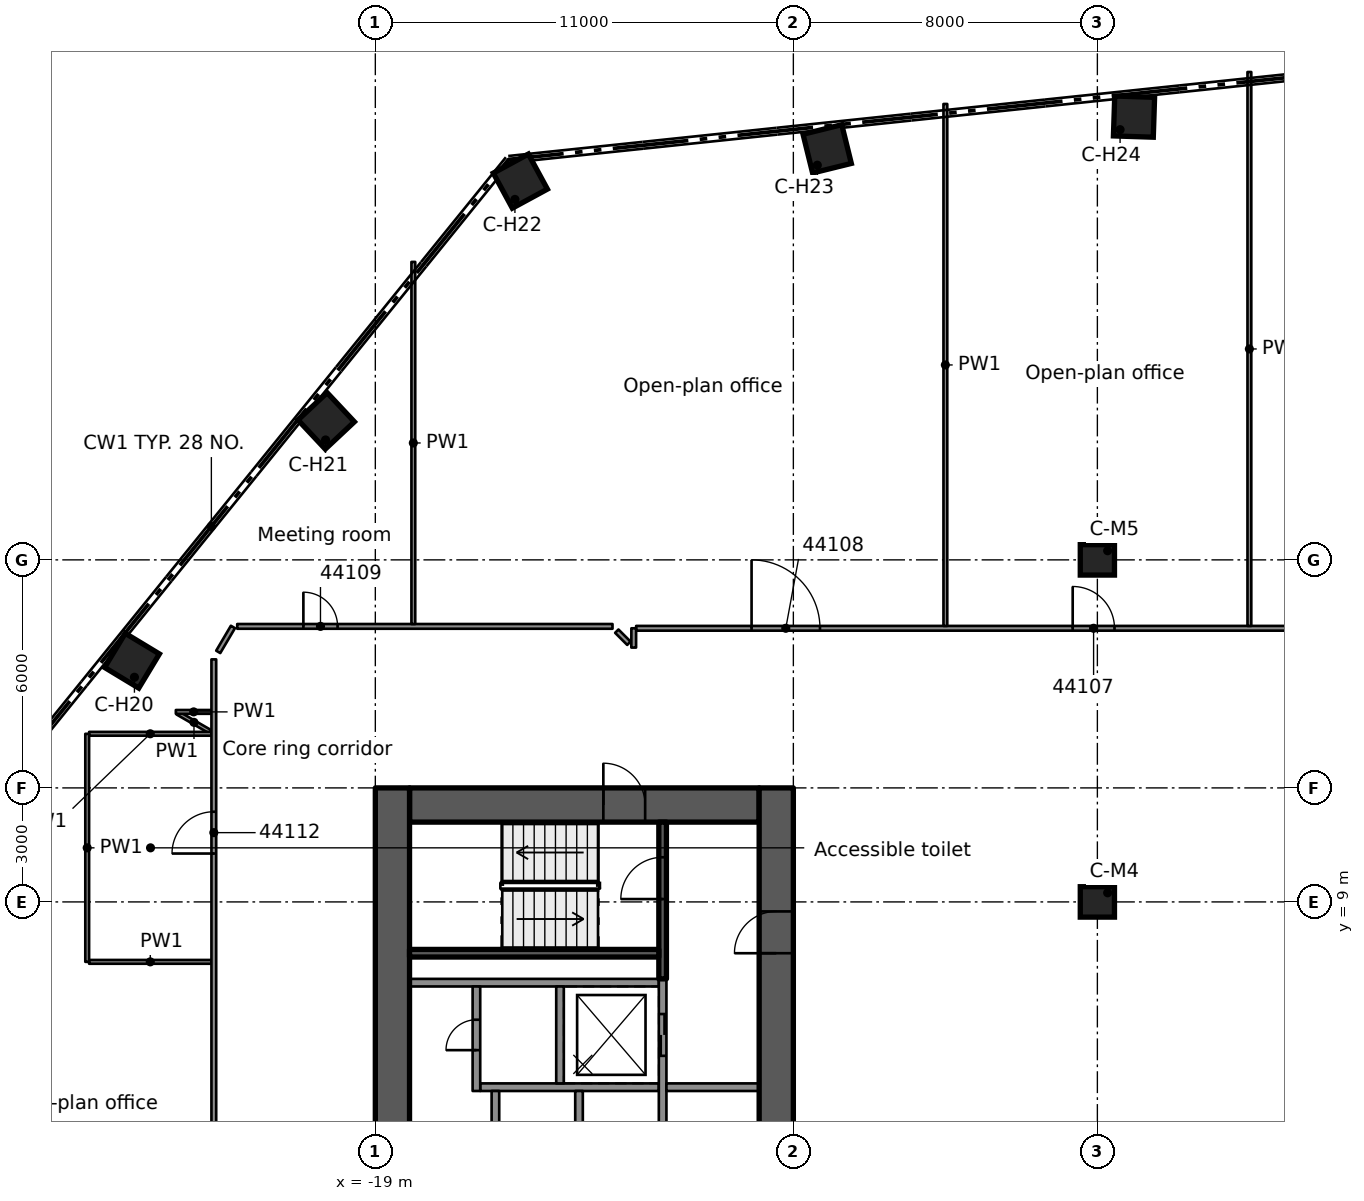
"""IFC4 building model, lengths in metres.
Left out: names, types, materials, properties, quantities, classifications, styles, units other than length and angle.
Written with IfcOpenShell. Run it as: python <this file> out.ifc"""

import sys

from ifc_helpers import new_model, si_unit, direction, frame, frame_2d, origin, origin_2d, place, context, subcontext, project, spatial, rectangle, extrude, element, fill, save


model = new_model("IFC4")
c1 = context("Model", 3, precision=1e-05, world=origin(), true_north=direction((0.0, 1.0)))
c2 = subcontext(c1, "Body", "Model", "MODEL_VIEW")
j1 = project(units=[si_unit("LENGTHUNIT", "METRE"), si_unit("PLANEANGLEUNIT", "RADIAN")], contexts=[c1])
p1 = place(None, origin())
s1 = spatial("IfcSite", under=j1, at=p1, CompositionType="ELEMENT")
p2 = place(p1, origin())
s2 = spatial("IfcBuilding", under=s1, at=p2, CompositionType="ELEMENT")
p3 = place(p2, frame((0.0, 0.0, 217.5)))
s3 = spatial("IfcBuildingStorey", under=s2, at=p3, CompositionType="ELEMENT", Elevation=217.5)
p4 = place(p3, frame((-18.1, 11.55, 0.0), z_axis=(0.0, 0.0, 1.0), x_axis=(1.0, 0.0, 0.0)))
e1 = element("IfcWall", 1, at=p4, inside=s3, PredefinedType="SHEAR", context=c2, shape_type="SweptSolid", body=[
    extrude(rectangle(XDim=9.2, YDim=0.9, at=frame_2d((4.6, 0.0))), origin(), (0.0, 0.0, 1.0), 3.5),
])
p5 = place(p4, frame((5.1, 0.0, 0.0)))
e2 = element("IfcOpeningElement", 2, at=p5, cuts=e1, PredefinedType="OPENING", context=c2, shape_type="SweptSolid", body=[
    extrude(rectangle(XDim=1.1, YDim=2.1, at=frame_2d((0.55, 1.05))), frame((0.0, 0.46, 0.0), z_axis=(0.0, -1.0, 0.0), x_axis=(1.0, 0.0, 0.0)), (0.0, 0.0, 1.0), 0.92),
])
p6 = place(p3, frame((-18.55, -12.0, 0.0), z_axis=(0.0, 0.0, 1.0), x_axis=(0.0, 1.0, 0.0)))
e3 = element("IfcWall", 3, at=p6, inside=s3, PredefinedType="SHEAR", context=c2, shape_type="SweptSolid", body=[
    extrude(rectangle(XDim=24.0, YDim=0.9, at=frame_2d((12.0, 0.0))), origin(), (0.0, 0.0, 1.0), 3.5),
])
p7 = place(p6, frame((10.1, 0.0, 0.0)))
e4 = element("IfcOpeningElement", 4, at=p7, cuts=e3, PredefinedType="OPENING", context=c2, shape_type="SweptSolid", body=[
    extrude(rectangle(XDim=1.8, YDim=2.1, at=frame_2d((0.9, 1.05))), frame((0.0, 0.46, 0.0), z_axis=(0.0, -1.0, 0.0), x_axis=(1.0, 0.0, 0.0)), (0.0, 0.0, 1.0), 0.92),
])
p8 = place(p3, frame((-8.45, -12.0, 0.0), z_axis=(0.0, 0.0, 1.0), x_axis=(0.0, 1.0, 0.0)))
e5 = element("IfcWall", 5, at=p8, inside=s3, PredefinedType="SHEAR", context=c2, shape_type="SweptSolid", body=[
    extrude(rectangle(XDim=24.0, YDim=0.9, at=frame_2d((12.0, 0.0))), origin(), (0.0, 0.0, 1.0), 3.5),
])
p9 = place(p8, frame((9.6, 0.0, 0.0)))
e6 = element("IfcOpeningElement", 6, at=p9, cuts=e5, PredefinedType="OPENING", context=c2, shape_type="SweptSolid", body=[
    extrude(rectangle(XDim=1.8, YDim=2.1, at=frame_2d((0.9, 1.05))), frame((0.0, 0.46, 0.0), z_axis=(0.0, -1.0, 0.0), x_axis=(1.0, 0.0, 0.0)), (0.0, 0.0, 1.0), 0.92),
])
p10 = place(p8, frame((19.65, 0.0, 0.0)))
e7 = element("IfcOpeningElement", 7, at=p10, cuts=e5, PredefinedType="OPENING", context=c2, shape_type="SweptSolid", body=[
    extrude(rectangle(XDim=1.1, YDim=2.1, at=frame_2d((0.55, 1.05))), frame((0.0, 0.46, 0.0), z_axis=(0.0, -1.0, 0.0), x_axis=(1.0, 0.0, 0.0)), (0.0, 0.0, 1.0), 0.92),
])
for number, where, z_axis, x_axis in (
    (8, (-25.403, 15.347, 0.0), (0.0, 0.0, 1.0), (-0.856, 0.517, 0.0)),
    (9, (-20.293, 21.657, 0.0), (0.0, 0.0, 1.0), (-0.684, 0.73, 0.0)),
    (10, (-15.184, 27.966, 0.0), (0.0, 0.0, 1.0), (-0.477, 0.879, 0.0)),
    (11, (-7.11, 28.815, 0.0), (0.0, 0.0, 1.0), (-0.24, 0.971, 0.0)),
    (12, (0.964, 29.663, 0.0), (0.0, 0.0, 1.0), (0.032, 0.999, 0.0)),
):
    element("IfcColumn", number, at=place(p3, frame(where, z_axis=z_axis, x_axis=x_axis)), inside=s3, PredefinedType="COLUMN", context=c2, shape_type="SweptSolid", body=[
        extrude(rectangle(XDim=1.05, YDim=1.05, at=origin_2d()), origin(), (0.0, 0.0, 1.0), 3.5),
    ])
for number, where, z_axis, x_axis in (
    (13, (0.0, 9.0, 0.0), (0.0, 0.0, 1.0), (1.0, 0.0, 0.0)),
    (14, (0.0, 18.0, 0.0), (0.0, 0.0, 1.0), (1.0, 0.0, 0.0)),
):
    element("IfcColumn", number, at=place(p3, frame(where, z_axis=z_axis, x_axis=x_axis)), inside=s3, PredefinedType="COLUMN", context=c2, shape_type="SweptSolid", body=[
        extrude(rectangle(XDim=0.9, YDim=0.8, at=origin_2d()), origin(), (0.0, 0.0, 1.0), 3.5),
    ])
p11 = place(p3, frame((-11.54, 6.875, 0.0), z_axis=(0.0, 0.0, 1.0), x_axis=(-1.0, 0.0, 0.0)))
e15 = element("IfcWall", 15, at=p11, inside=s3, PredefinedType="SOLIDWALL", context=c2, shape_type="SweptSolid", body=[
    extrude(rectangle(XDim=6.56, YDim=0.2, at=frame_2d((3.28, 0.0))), origin(), (0.0, 0.0, 1.0), 3.08),
])
p12 = place(p3, frame((-11.54, 4.125, 0.0), z_axis=(0.0, 0.0, 1.0), x_axis=(-1.0, 0.0, 0.0)))
e16 = element("IfcWall", 16, at=p12, inside=s3, PredefinedType="SOLIDWALL", context=c2, shape_type="SweptSolid", body=[
    extrude(rectangle(XDim=4.7, YDim=0.2, at=frame_2d((2.35, 0.0))), origin(), (0.0, 0.0, 1.0), 3.08),
])
p13 = place(p3, frame((-11.44, -6.975, 0.0), z_axis=(0.0, 0.0, 1.0), x_axis=(0.0, 1.0, 0.0)))
e17 = element("IfcWall", 17, at=p13, inside=s3, PredefinedType="SOLIDWALL", context=c2, shape_type="SweptSolid", body=[
    extrude(rectangle(XDim=13.95, YDim=0.2, at=frame_2d((6.975, 0.0))), origin(), (0.0, 0.0, 1.0), 3.08),
])
p14 = place(p13, frame((0.925, 0.0, 0.0)))
e18 = element("IfcOpeningElement", 18, at=p14, cuts=e17, PredefinedType="OPENING", context=c2, shape_type="SweptSolid", body=[
    extrude(rectangle(XDim=1.1, YDim=2.1, at=frame_2d((0.55, 1.05))), frame((0.0, 0.11, 0.0), z_axis=(0.0, -1.0, 0.0), x_axis=(1.0, 0.0, 0.0)), (0.0, 0.0, 1.0), 0.22),
])
p15 = place(p13, frame((3.675, 0.0, 0.0)))
e19 = element("IfcOpeningElement", 19, at=p15, cuts=e17, PredefinedType="OPENING", context=c2, shape_type="SweptSolid", body=[
    extrude(rectangle(XDim=1.1, YDim=2.1, at=frame_2d((0.55, 1.05))), frame((0.0, 0.11, 0.0), z_axis=(0.0, -1.0, 0.0), x_axis=(1.0, 0.0, 0.0)), (0.0, 0.0, 1.0), 0.22),
])
p16 = place(p13, frame((11.925, 0.0, 0.0)))
e20 = element("IfcOpeningElement", 20, at=p16, cuts=e17, PredefinedType="OPENING", context=c2, shape_type="SweptSolid", body=[
    extrude(rectangle(XDim=1.1, YDim=2.1, at=frame_2d((0.55, 1.05))), frame((0.0, 0.11, 0.0), z_axis=(0.0, -1.0, 0.0), x_axis=(1.0, 0.0, 0.0)), (0.0, 0.0, 1.0), 0.22),
])
p17 = place(p13, frame((6.575, 0.0, 0.0)))
e21 = element("IfcOpeningElement", 21, at=p17, cuts=e17, PredefinedType="OPENING", context=c2, shape_type="SweptSolid", body=[
    extrude(rectangle(XDim=0.8, YDim=2.1, at=frame_2d((0.4, 1.05))), frame((0.0, 0.11, 0.0), z_axis=(0.0, -1.0, 0.0), x_axis=(1.0, 0.0, 0.0)), (0.0, 0.0, 1.0), 0.22),
])
p18 = place(p3, frame((-13.64, -4.025, 0.0), z_axis=(0.0, 0.0, 1.0), x_axis=(0.0, 1.0, 0.0)))
e22 = element("IfcWall", 22, at=p18, inside=s3, PredefinedType="SOLIDWALL", context=c2, shape_type="SweptSolid", body=[
    extrude(rectangle(XDim=8.05, YDim=0.2, at=frame_2d((4.025, 0.0))), origin(), (0.0, 0.0, 1.0), 3.08),
])
p19 = place(p3, frame((-14.14, 4.225, 0.0), z_axis=(0.0, 0.0, 1.0), x_axis=(0.0, 1.0, 0.0)))
e23 = element("IfcWall", 23, at=p19, inside=s3, PredefinedType="SOLIDWALL", context=c2, shape_type="SweptSolid", body=[
    extrude(rectangle(XDim=2.55, YDim=0.2, at=frame_2d((1.275, 0.0))), origin(), (0.0, 0.0, 1.0), 3.08),
])
p20 = place(p3, frame((-15.84, -4.025, 0.0), z_axis=(0.0, 0.0, 1.0), x_axis=(0.0, 1.0, 0.0)))
e24 = element("IfcWall", 24, at=p20, inside=s3, PredefinedType="SOLIDWALL", context=c2, shape_type="SweptSolid", body=[
    extrude(rectangle(XDim=8.05, YDim=0.2, at=frame_2d((4.025, 0.0))), origin(), (0.0, 0.0, 1.0), 3.08),
])
p21 = place(p20, frame((0.875, 0.0, 0.0)))
e25 = element("IfcOpeningElement", 25, at=p21, cuts=e24, PredefinedType="OPENING", context=c2, shape_type="SweptSolid", body=[
    extrude(rectangle(XDim=0.8, YDim=2.1, at=frame_2d((0.4, 1.05))), frame((0.0, 0.11, 0.0), z_axis=(0.0, -1.0, 0.0), x_axis=(1.0, 0.0, 0.0)), (0.0, 0.0, 1.0), 0.22),
])
p22 = place(p3, frame((-16.34, 4.025, 0.0), z_axis=(0.0, 0.0, 1.0), x_axis=(0.0, 1.0, 0.0)))
e26 = element("IfcWall", 26, at=p22, inside=s3, PredefinedType="SOLIDWALL", context=c2, shape_type="SweptSolid", body=[
    extrude(rectangle(XDim=2.75, YDim=0.2, at=frame_2d((1.375, 0.0))), origin(), (0.0, 0.0, 1.0), 3.08),
])
p23 = place(p22, frame((1.075, 0.0, 0.0)))
e27 = element("IfcOpeningElement", 27, at=p23, cuts=e26, PredefinedType="OPENING", context=c2, shape_type="SweptSolid", body=[
    extrude(rectangle(XDim=0.8, YDim=2.1, at=frame_2d((0.4, 1.05))), frame((0.0, 0.11, 0.0), z_axis=(0.0, -1.0, 0.0), x_axis=(1.0, 0.0, 0.0)), (0.0, 0.0, 1.0), 0.22),
])
p24 = place(p3, frame((-11.44, 6.975, 0.0), z_axis=(0.0, 0.0, 1.0), x_axis=(0.0, 1.0, 0.0)))
e28 = element("IfcWall", 28, at=p24, inside=s3, PredefinedType="SOLIDWALL", context=c2, shape_type="SweptSolid", body=[
    extrude(rectangle(XDim=4.125, YDim=0.2, at=frame_2d((2.062, 0.0))), origin(), (0.0, 0.0, 1.0), 3.08),
])
p25 = place(p24, frame((2.1, 0.0, 0.0)))
e29 = element("IfcOpeningElement", 29, at=p25, cuts=e28, PredefinedType="OPENING", context=c2, shape_type="SweptSolid", body=[
    extrude(rectangle(XDim=1.1, YDim=2.1, at=frame_2d((0.55, 1.05))), frame((0.0, 0.11, 0.0), z_axis=(0.0, -1.0, 0.0), x_axis=(1.0, 0.0, 0.0)), (0.0, 0.0, 1.0), 0.22),
])
p26 = place(p3, frame((-11.54, 7.65, 0.0), z_axis=(0.0, 0.0, 1.0), x_axis=(-1.0, 0.0, 0.0)))
e30 = element("IfcWall", 30, at=p26, inside=s3, PredefinedType="SOLIDWALL", context=c2, shape_type="SweptSolid", body=[
    extrude(rectangle(XDim=6.56, YDim=0.2, at=frame_2d((3.28, 0.0))), origin(), (0.0, 0.0, 1.0), 3.08),
])
p27 = place(p3, frame((-8.9, 4.125, 0.0), z_axis=(0.0, 0.0, 1.0), x_axis=(-1.0, 0.0, 0.0)))
e31 = element("IfcWall", 31, at=p27, inside=s3, PredefinedType="PARTITIONING", context=c2, shape_type="SweptSolid", body=[
    extrude(rectangle(XDim=2.44, YDim=0.2, at=frame_2d((1.22, 0.0))), origin(), (0.0, 0.0, 1.0), 3.08),
])
p28 = place(p3, frame((-12.646, 16.124, 0.0), z_axis=(0.0, 0.0, 1.0), x_axis=(0.707106781187, -0.707106781187, 0.0)))
e32 = element("IfcWall", 32, at=p28, inside=s3, PredefinedType="PARTITIONING", context=c2, shape_type="SweptSolid", body=[
    extrude(rectangle(XDim=0.45, YDim=0.125, at=frame_2d((0.225, 0.0))), origin(), (0.0, 0.0, 1.0), 3.06),
])
p29 = place(p3, frame((-24.206, 13.975, 0.0), z_axis=(0.0, 0.0, 1.0), x_axis=(0.866136921896, -0.4998067952, 0.0)))
e33 = element("IfcWall", 33, at=p29, inside=s3, PredefinedType="PARTITIONING", context=c2, shape_type="SweptSolid", body=[
    extrude(rectangle(XDim=1.002, YDim=0.1, at=frame_2d((0.501, 0.0))), origin(), (0.0, 0.0, 1.0), 3.06),
])
p30 = place(p3, frame((-26.532, 7.423, 0.0), z_axis=(0.0, 0.0, 1.0), x_axis=(1.0, 0.0, 0.0)))
e34 = element("IfcWall", 34, at=p30, inside=s3, PredefinedType="PARTITIONING", context=c2, shape_type="SweptSolid", body=[
    extrude(rectangle(XDim=3.22, YDim=0.1, at=frame_2d((1.61, 0.0))), origin(), (0.0, 0.0, 1.0), 3.06),
])
p31 = place(p3, frame((-26.531, 13.424, 0.0), z_axis=(0.0, 0.0, 1.0), x_axis=(1.0, 0.0, 0.0)))
e35 = element("IfcWall", 35, at=p31, inside=s3, PredefinedType="PARTITIONING", context=c2, shape_type="SweptSolid", body=[
    extrude(rectangle(XDim=3.217, YDim=0.1, at=frame_2d((1.608, 0.0))), origin(), (0.0, 0.0, 1.0), 3.06),
])
p32 = place(p3, frame((-24.249, 14.0, 0.0), z_axis=(0.0, 0.0, 1.0), x_axis=(1.0, 0.0, 0.0)))
e36 = element("IfcWall", 36, at=p32, inside=s3, PredefinedType="PARTITIONING", context=c2, shape_type="SweptSolid", body=[
    extrude(rectangle(XDim=0.937, YDim=0.1, at=frame_2d((0.469, 0.0))), origin(), (0.0, 0.0, 1.0), 3.06),
])
p33 = place(p3, frame((-12.137, 16.2, 0.0), z_axis=(0.0, 0.0, 1.0), x_axis=(1.0, 0.0, 0.0)))
e37 = element("IfcWall", 37, at=p33, inside=s3, PredefinedType="PARTITIONING", context=c2, shape_type="SweptSolid", body=[
    extrude(rectangle(XDim=24.276, YDim=0.125, at=frame_2d((12.138, 0.0))), origin(), (0.0, 0.0, 1.0), 3.06),
])
p34 = place(p33, frame((19.238, 0.0, 0.0)))
e38 = element("IfcOpeningElement", 38, at=p34, cuts=e37, PredefinedType="OPENING", context=c2, shape_type="SweptSolid", body=[
    extrude(rectangle(XDim=1.8, YDim=2.1, at=frame_2d((0.9, 1.05))), frame((0.0, 0.073, 0.0), z_axis=(0.0, -1.0, 0.0), x_axis=(1.0, 0.0, 0.0)), (0.0, 0.0, 1.0), 0.145),
])
p35 = place(p33, frame((11.488, 0.0, 0.0)))
e39 = element("IfcOpeningElement", 39, at=p35, cuts=e37, PredefinedType="OPENING", context=c2, shape_type="SweptSolid", body=[
    extrude(rectangle(XDim=1.1, YDim=2.1, at=frame_2d((0.55, 1.05))), frame((0.0, 0.073, 0.0), z_axis=(0.0, -1.0, 0.0), x_axis=(1.0, 0.0, 0.0)), (0.0, 0.0, 1.0), 0.145),
])
p36 = place(p33, frame((3.038, 0.0, 0.0)))
e40 = element("IfcOpeningElement", 40, at=p36, cuts=e37, PredefinedType="OPENING", context=c2, shape_type="SweptSolid", body=[
    extrude(rectangle(XDim=1.8, YDim=2.1, at=frame_2d((0.9, 1.05))), frame((0.0, 0.073, 0.0), z_axis=(0.0, -1.0, 0.0), x_axis=(1.0, 0.0, 0.0)), (0.0, 0.0, 1.0), 0.145),
])
p37 = place(p3, frame((-22.634, 16.25, 0.0), z_axis=(0.0, 0.0, 1.0), x_axis=(1.0, 0.0, 0.0)))
e41 = element("IfcWall", 41, at=p37, inside=s3, PredefinedType="PARTITIONING", context=c2, shape_type="SweptSolid", body=[
    extrude(rectangle(XDim=9.875, YDim=0.125, at=frame_2d((4.938, 0.0))), origin(), (0.0, 0.0, 1.0), 3.06),
])
p38 = place(p37, frame((1.74, 0.0, 0.0)))
e42 = element("IfcOpeningElement", 42, at=p38, cuts=e41, PredefinedType="OPENING", context=c2, shape_type="SweptSolid", body=[
    extrude(rectangle(XDim=0.9, YDim=2.1, at=frame_2d((0.45, 1.05))), frame((0.0, 0.073, 0.0), z_axis=(0.0, -1.0, 0.0), x_axis=(1.0, 0.0, 0.0)), (0.0, 0.0, 1.0), 0.145),
])
p39 = place(p3, frame((-23.134, 15.579, 0.0), z_axis=(0.0, 0.0, 1.0), x_axis=(0.508070392977, 0.861315549482, 0.0)))
e43 = element("IfcWall", 43, at=p39, inside=s3, PredefinedType="PARTITIONING", context=c2, shape_type="SweptSolid", body=[
    extrude(rectangle(XDim=0.762, YDim=0.125, at=frame_2d((0.381, 0.0))), origin(), (0.0, 0.0, 1.0), 3.06),
])
p40 = place(p3, frame((-12.201, 15.692, 0.0), z_axis=(0.0, 0.0, 1.0), x_axis=(0.00192214926, 0.999998152669, 0.0)))
e44 = element("IfcWall", 44, at=p40, inside=s3, PredefinedType="PARTITIONING", context=c2, shape_type="SweptSolid", body=[
    extrude(rectangle(XDim=0.508, YDim=0.125, at=frame_2d((0.254, 0.0))), origin(), (0.0, 0.0, 1.0), 3.06),
])
p41 = place(p3, frame((4.0, 16.262, 0.0), z_axis=(0.0, 0.0, 1.0), x_axis=(0.0, 1.0, 0.0)))
e45 = element("IfcWall", 45, at=p41, inside=s3, PredefinedType="PARTITIONING", context=c2, shape_type="SweptSolid", body=[
    extrude(rectangle(XDim=14.575, YDim=0.1, at=frame_2d((7.288, 0.0))), origin(), (0.0, 0.0, 1.0), 3.06),
])
p42 = place(p3, frame((-4.0, 16.262, 0.0), z_axis=(0.0, 0.0, 1.0), x_axis=(0.0, 1.0, 0.0)))
e46 = element("IfcWall", 46, at=p42, inside=s3, PredefinedType="PARTITIONING", context=c2, shape_type="SweptSolid", body=[
    extrude(rectangle(XDim=13.734, YDim=0.1, at=frame_2d((6.867, 0.0))), origin(), (0.0, 0.0, 1.0), 3.06),
])
p43 = place(p3, frame((-18.0, 16.312, 0.0), z_axis=(0.0, 0.0, 1.0), x_axis=(0.0, 1.0, 0.0)))
e47 = element("IfcWall", 47, at=p43, inside=s3, PredefinedType="PARTITIONING", context=c2, shape_type="SweptSolid", body=[
    extrude(rectangle(XDim=9.528, YDim=0.1, at=frame_2d((4.764, 0.0))), origin(), (0.0, 0.0, 1.0), 3.06),
])
p44 = place(p3, frame((-23.25, -13.423, 0.0), z_axis=(0.0, 0.0, 1.0), x_axis=(0.0, 1.0, 0.0)))
e48 = element("IfcWall", 48, at=p44, inside=s3, PredefinedType="PARTITIONING", context=c2, shape_type="SweptSolid", body=[
    extrude(rectangle(XDim=28.805, YDim=0.125, at=frame_2d((14.403, 0.0))), origin(), (0.0, 0.0, 1.0), 3.06),
])
p45 = place(p44, frame((9.6, 0.0, 0.0)))
e49 = element("IfcOpeningElement", 49, at=p45, cuts=e48, PredefinedType="OPENING", context=c2, shape_type="SweptSolid", body=[
    extrude(rectangle(XDim=1.8, YDim=2.1, at=frame_2d((0.9, 1.05))), frame((0.0, 0.073, 0.0), z_axis=(0.0, -1.0, 0.0), x_axis=(1.0, 0.0, 0.0)), (0.0, 0.0, 1.0), 0.145),
])
p46 = place(p44, frame((23.696, 0.0, 0.0)))
e50 = element("IfcOpeningElement", 50, at=p46, cuts=e48, PredefinedType="OPENING", context=c2, shape_type="SweptSolid", body=[
    extrude(rectangle(XDim=1.1, YDim=2.1, at=frame_2d((0.55, 1.05))), frame((0.0, 0.073, 0.0), z_axis=(0.0, -1.0, 0.0), x_axis=(1.0, 0.0, 0.0)), (0.0, 0.0, 1.0), 0.145),
])
p47 = place(p3, frame((-26.582, 7.423, 0.0), z_axis=(0.0, 0.0, 1.0), x_axis=(0.0, 1.0, 0.0)))
e51 = element("IfcWall", 51, at=p47, inside=s3, PredefinedType="PARTITIONING", context=c2, shape_type="SweptSolid", body=[
    extrude(rectangle(XDim=6.0, YDim=0.1, at=frame_2d((3.0, 0.0))), origin(), (0.0, 0.0, 1.0), 3.06),
])
p48 = place(p16, origin())
e52 = element("IfcDoor", 52, at=p48, inside=s3, OperationType="DOUBLE_DOOR_SLIDING", PredefinedType="DOOR", context=c2, shape_type="SweptSolid", body=[
    extrude(rectangle(XDim=1.1, YDim=2.1, at=frame_2d((0.55, 1.05))), frame((0.0, 0.025, 0.0), z_axis=(0.0, -1.0, 0.0), x_axis=(1.0, 0.0, 0.0)), (0.0, 0.0, 1.0), 0.05),
])
fill(e20, e52)
p49 = place(p23, origin())
e53 = element("IfcDoor", 53, at=p49, inside=s3, OperationType="SINGLE_SWING_LEFT", PredefinedType="DOOR", context=c2, shape_type="SweptSolid", body=[
    extrude(rectangle(XDim=0.8, YDim=2.1, at=frame_2d((0.4, 1.05))), frame((0.0, 0.025, 0.0), z_axis=(0.0, -1.0, 0.0), x_axis=(1.0, 0.0, 0.0)), (0.0, 0.0, 1.0), 0.05),
])
fill(e27, e53)
p50 = place(p10, origin())
e54 = element("IfcDoor", 54, at=p50, inside=s3, OperationType="SINGLE_SWING_RIGHT", PredefinedType="DOOR", context=c2, shape_type="SweptSolid", body=[
    extrude(rectangle(XDim=1.1, YDim=2.1, at=frame_2d((0.55, 1.05))), frame((0.0, 0.025, 0.0), z_axis=(0.0, -1.0, 0.0), x_axis=(1.0, 0.0, 0.0)), (0.0, 0.0, 1.0), 0.05),
])
fill(e7, e54)
p51 = place(p5, origin())
e55 = element("IfcDoor", 55, at=p51, inside=s3, OperationType="SINGLE_SWING_RIGHT", PredefinedType="DOOR", context=c2, shape_type="SweptSolid", body=[
    extrude(rectangle(XDim=1.1, YDim=2.1, at=frame_2d((0.55, 1.05))), frame((0.0, 0.025, 0.0), z_axis=(0.0, -1.0, 0.0), x_axis=(1.0, 0.0, 0.0)), (0.0, 0.0, 1.0), 0.05),
])
fill(e2, e55)
p52 = place(p25, origin())
e56 = element("IfcDoor", 56, at=p52, inside=s3, OperationType="SINGLE_SWING_RIGHT", PredefinedType="DOOR", context=c2, shape_type="SweptSolid", body=[
    extrude(rectangle(XDim=1.1, YDim=2.1, at=frame_2d((0.55, 1.05))), frame((0.0, 0.025, 0.0), z_axis=(0.0, -1.0, 0.0), x_axis=(1.0, 0.0, 0.0)), (0.0, 0.0, 1.0), 0.05),
])
fill(e29, e56)
p53 = place(p35, origin())
e57 = element("IfcDoor", 57, at=p53, inside=s3, OperationType="SINGLE_SWING_LEFT", PredefinedType="DOOR", context=c2, shape_type="SweptSolid", body=[
    extrude(rectangle(XDim=1.1, YDim=2.1, at=frame_2d((0.55, 1.05))), frame((0.0, 0.025, 0.0), z_axis=(0.0, -1.0, 0.0), x_axis=(1.0, 0.0, 0.0)), (0.0, 0.0, 1.0), 0.05),
])
fill(e39, e57)
p54 = place(p36, origin())
e58 = element("IfcDoor", 58, at=p54, inside=s3, OperationType="DOUBLE_DOOR_SINGLE_SWING", PredefinedType="DOOR", context=c2, shape_type="SweptSolid", body=[
    extrude(rectangle(XDim=1.8, YDim=2.1, at=frame_2d((0.9, 1.05))), frame((0.0, 0.025, 0.0), z_axis=(0.0, -1.0, 0.0), x_axis=(1.0, 0.0, 0.0)), (0.0, 0.0, 1.0), 0.05),
])
fill(e40, e58)
p55 = place(p38, origin())
e59 = element("IfcDoor", 59, at=p55, inside=s3, OperationType="SINGLE_SWING_LEFT", PredefinedType="DOOR", context=c2, shape_type="SweptSolid", body=[
    extrude(rectangle(XDim=0.9, YDim=2.1, at=frame_2d((0.45, 1.05))), frame((0.0, 0.025, 0.0), z_axis=(0.0, -1.0, 0.0), x_axis=(1.0, 0.0, 0.0)), (0.0, 0.0, 1.0), 0.05),
])
fill(e42, e59)
p56 = place(p46, origin())
e60 = element("IfcDoor", 60, at=p56, inside=s3, OperationType="SINGLE_SWING_RIGHT", PredefinedType="DOOR", context=c2, shape_type="SweptSolid", body=[
    extrude(rectangle(XDim=1.1, YDim=2.1, at=frame_2d((0.55, 1.05))), frame((0.0, 0.025, 0.0), z_axis=(0.0, -1.0, 0.0), x_axis=(1.0, 0.0, 0.0)), (0.0, 0.0, 1.0), 0.05),
])
fill(e50, e60)
save(model, sys.argv[1])
